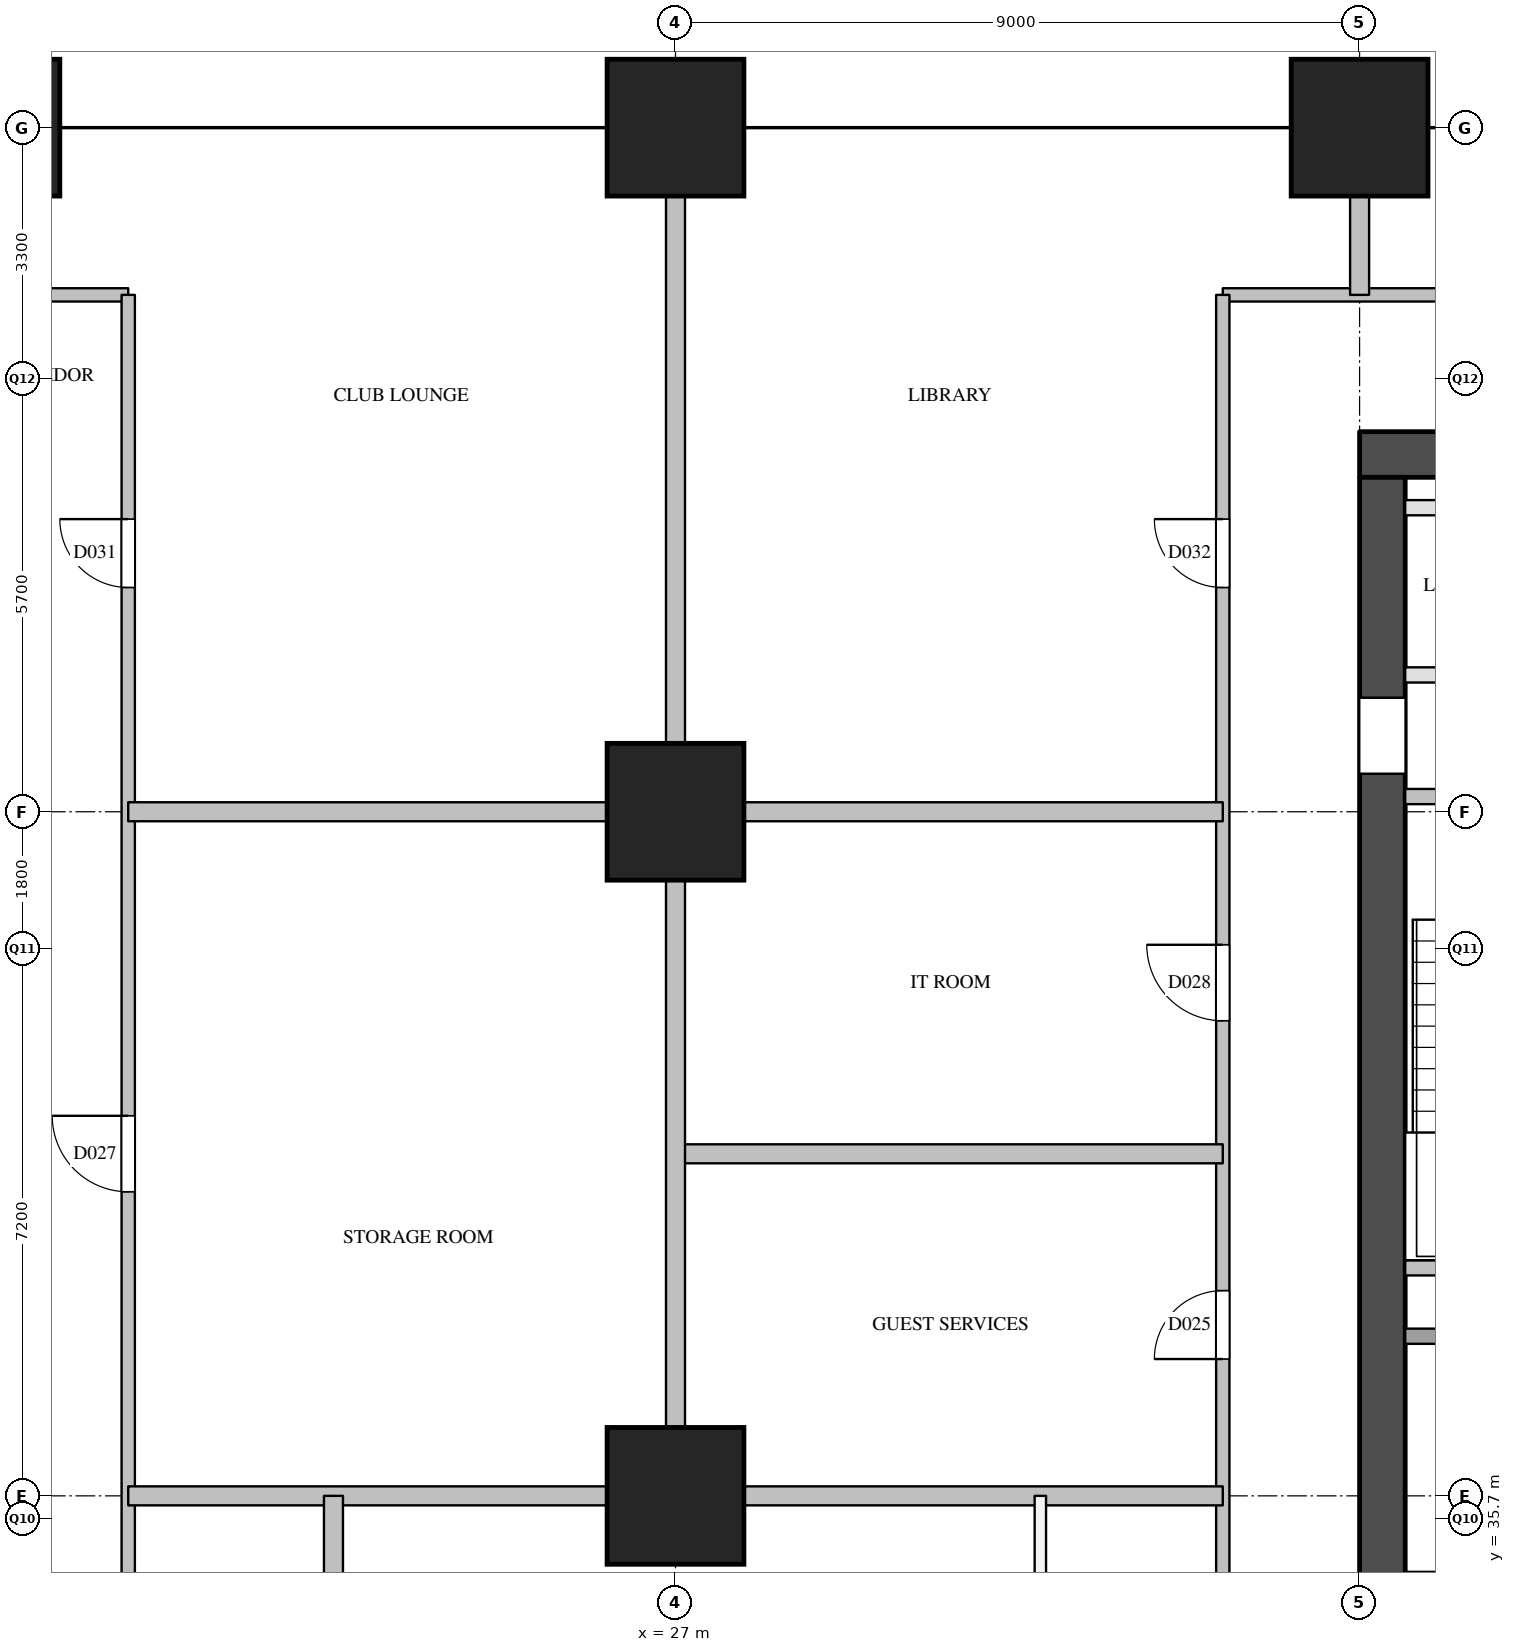
"""IFC4 building model, lengths in metres.
Left out: names, types, materials, properties, quantities, classifications, styles, units other than length and angle.
Written with IfcOpenShell. Run it as: python <this file> out.ifc"""

import sys

from ifc_helpers import new_model, si_unit, direction, frame, frame_2d, origin, origin_2d, place, context, subcontext, project, spatial, rectangle, extrude, element, fill, save


model = new_model("IFC4")
c1 = context("Model", 3, precision=1e-05, world=origin(), true_north=direction((0.0, 1.0)))
c2 = subcontext(c1, "Body", "Model", "MODEL_VIEW")
j1 = project(units=[si_unit("LENGTHUNIT", "METRE"), si_unit("PLANEANGLEUNIT", "RADIAN")], contexts=[c1])
p1 = place(None, origin())
s1 = spatial("IfcSite", under=j1, at=p1, CompositionType="ELEMENT")
p2 = place(p1, origin())
s2 = spatial("IfcBuilding", under=s1, at=p2, CompositionType="ELEMENT")
p3 = place(p2, frame((0.0, 0.0, 100.6)))
s3 = spatial("IfcBuildingStorey", under=s2, at=p3, CompositionType="ELEMENT", Elevation=100.6)
for number, where, z_axis, x_axis in (
    (1, (18.0, 54.0, 0.0), (0.0, 0.0, 1.0), (1.0, 0.0, 0.0)),
    (2, (27.0, 36.0, 0.0), (0.0, 0.0, 1.0), (1.0, 0.0, 0.0)),
    (3, (27.0, 45.0, 0.0), (0.0, 0.0, 1.0), (1.0, 0.0, 0.0)),
    (4, (27.0, 54.0, 0.0), (0.0, 0.0, 1.0), (1.0, 0.0, 0.0)),
    (5, (36.0, 54.0, 0.0), (0.0, 0.0, 1.0), (1.0, 0.0, 0.0)),
):
    element("IfcColumn", number, at=place(p3, frame(where, z_axis=z_axis, x_axis=x_axis)), inside=s3, PredefinedType="COLUMN", context=c2, shape_type="SweptSolid", body=[
        extrude(rectangle(XDim=1.8, YDim=1.8, at=origin_2d()), origin(), (0.0, 0.0, 1.0), 3.8),
    ])
p4 = place(p3, frame((36.0, 49.7, 0.0), z_axis=(0.0, 0.0, 1.0), x_axis=(1.0, 0.0, 0.0)))
e6 = element("IfcWall", 6, at=p4, inside=s3, PredefinedType="SHEAR", context=c2, shape_type="SweptSolid", body=[
    extrude(rectangle(XDim=12.4, YDim=0.6, at=frame_2d((6.2, 0.0))), origin(), (0.0, 0.0, 1.0), 3.5),
])
p5 = place(p3, frame((36.3, 29.1, 0.0), z_axis=(0.0, 0.0, 1.0), x_axis=(0.0, 1.0, 0.0)))
e7 = element("IfcWall", 7, at=p5, inside=s3, PredefinedType="SHEAR", context=c2, shape_type="SweptSolid", body=[
    extrude(rectangle(XDim=20.3, YDim=0.6, at=frame_2d((10.15, 0.0))), origin(), (0.0, 0.0, 1.0), 3.5),
])
p6 = place(p5, frame((3.6, 0.0, 0.0)))
e8 = element("IfcOpeningElement", 8, at=p6, cuts=e7, PredefinedType="OPENING", context=c2, shape_type="SweptSolid", body=[
    extrude(rectangle(XDim=1.8, YDim=2.1, at=frame_2d((0.9, 1.05))), frame((0.0, 0.31, 0.0), z_axis=(0.0, -1.0, 0.0), x_axis=(1.0, 0.0, 0.0)), (0.0, 0.0, 1.0), 0.62),
])
p7 = place(p5, frame((16.4, 0.0, 0.0)))
e9 = element("IfcOpeningElement", 9, at=p7, cuts=e7, PredefinedType="OPENING", context=c2, shape_type="SweptSolid", body=[
    extrude(rectangle(XDim=1.0, YDim=2.1, at=frame_2d((0.5, 1.05))), frame((0.0, 0.31, 0.0), z_axis=(0.0, -1.0, 0.0), x_axis=(1.0, 0.0, 0.0)), (0.0, 0.0, 1.0), 0.62),
])
p8 = place(p3, frame((36.6, 38.1, 0.0), z_axis=(0.0, 0.0, 1.0), x_axis=(1.0, 0.0, 0.0)))
e10 = element("IfcWall", 10, at=p8, inside=s3, PredefinedType="SOLIDWALL", context=c2, shape_type="SweptSolid", body=[
    extrude(rectangle(XDim=6.7, YDim=0.2, at=frame_2d((3.35, 0.0))), origin(), (0.0, 0.0, 1.0), 3.5),
])
p9 = place(p3, frame((36.6, 39.0, 0.0), z_axis=(0.0, 0.0, 1.0), x_axis=(1.0, 0.0, 0.0)))
e11 = element("IfcWall", 11, at=p9, inside=s3, PredefinedType="SOLIDWALL", context=c2, shape_type="SweptSolid", body=[
    extrude(rectangle(XDim=3.25, YDim=0.2, at=frame_2d((1.625, 0.0))), origin(), (0.0, 0.0, 1.0), 3.5),
])
p10 = place(p3, frame((36.6, 45.2, 0.0), z_axis=(0.0, 0.0, 1.0), x_axis=(1.0, 0.0, 0.0)))
e12 = element("IfcWall", 12, at=p10, inside=s3, PredefinedType="SOLIDWALL", context=c2, shape_type="SweptSolid", body=[
    extrude(rectangle(XDim=10.05, YDim=0.2, at=frame_2d((5.025, 0.0))), origin(), (0.0, 0.0, 1.0), 3.5),
])
p11 = place(p10, frame((1.125, 0.0, 0.0)))
e13 = element("IfcOpeningElement", 13, at=p11, cuts=e12, PredefinedType="OPENING", context=c2, shape_type="SweptSolid", body=[
    extrude(rectangle(XDim=1.1, YDim=2.1, at=frame_2d((0.55, 1.05))), frame((0.0, 0.11, 0.0), z_axis=(0.0, -1.0, 0.0), x_axis=(1.0, 0.0, 0.0)), (0.0, 0.0, 1.0), 0.22),
])
p12 = place(p10, frame((4.475, 0.0, 0.0)))
e14 = element("IfcOpeningElement", 14, at=p12, cuts=e12, PredefinedType="OPENING", context=c2, shape_type="SweptSolid", body=[
    extrude(rectangle(XDim=1.1, YDim=2.1, at=frame_2d((0.55, 1.05))), frame((0.0, 0.11, 0.0), z_axis=(0.0, -1.0, 0.0), x_axis=(1.0, 0.0, 0.0)), (0.0, 0.0, 1.0), 0.22),
])
p13 = place(p10, frame((7.825, 0.0, 0.0)))
e15 = element("IfcOpeningElement", 15, at=p13, cuts=e12, PredefinedType="OPENING", context=c2, shape_type="SweptSolid", body=[
    extrude(rectangle(XDim=1.1, YDim=2.1, at=frame_2d((0.55, 1.05))), frame((0.0, 0.11, 0.0), z_axis=(0.0, -1.0, 0.0), x_axis=(1.0, 0.0, 0.0)), (0.0, 0.0, 1.0), 0.22),
])
p14 = place(p3, frame((36.6, 46.8, 0.0), z_axis=(0.0, 0.0, 1.0), x_axis=(1.0, 0.0, 0.0)))
e16 = element("IfcWall", 16, at=p14, inside=s3, PredefinedType="PARTITIONING", context=c2, shape_type="SweptSolid", body=[
    extrude(rectangle(XDim=11.2, YDim=0.2, at=frame_2d((5.6, 0.0))), origin(), (0.0, 0.0, 1.0), 3.5),
])
p15 = place(p14, frame((1.23, 0.0, 0.0)))
e17 = element("IfcOpeningElement", 17, at=p15, cuts=e16, PredefinedType="OPENING", context=c2, shape_type="SweptSolid", body=[
    extrude(rectangle(XDim=0.9, YDim=2.1, at=frame_2d((0.45, 1.05))), frame((0.0, 0.11, 0.0), z_axis=(0.0, -1.0, 0.0), x_axis=(1.0, 0.0, 0.0)), (0.0, 0.0, 1.0), 0.22),
])
p16 = place(p14, frame((6.83, 0.0, 0.0)))
e18 = element("IfcOpeningElement", 18, at=p16, cuts=e16, PredefinedType="OPENING", context=c2, shape_type="SweptSolid", body=[
    extrude(rectangle(XDim=0.9, YDim=2.1, at=frame_2d((0.45, 1.05))), frame((0.0, 0.11, 0.0), z_axis=(0.0, -1.0, 0.0), x_axis=(1.0, 0.0, 0.0)), (0.0, 0.0, 1.0), 0.22),
])
p17 = place(p3, frame((36.6, 49.0, 0.0), z_axis=(0.0, 0.0, 1.0), x_axis=(1.0, 0.0, 0.0)))
e19 = element("IfcWall", 19, at=p17, inside=s3, PredefinedType="PARTITIONING", context=c2, shape_type="SweptSolid", body=[
    extrude(rectangle(XDim=11.2, YDim=0.2, at=frame_2d((5.6, 0.0))), origin(), (0.0, 0.0, 1.0), 3.5),
])
p18 = place(p3, frame((3.8, 51.8, 0.0), z_axis=(0.0, 0.0, 1.0), x_axis=(1.0, 0.0, 0.0)))
e20 = element("IfcWall", 20, at=p18, inside=s3, PredefinedType="PARTITIONING", context=c2, shape_type="SweptSolid", body=[
    extrude(rectangle(XDim=16.0, YDim=0.175, at=frame_2d((8.0, 0.0))), origin(), (0.0, 0.0, 1.0), 3.5),
])
p19 = place(p18, frame((6.314, 0.0, 0.0)))
e21 = element("IfcOpeningElement", 21, at=p19, cuts=e20, PredefinedType="OPENING", context=c2, shape_type="SweptSolid", body=[
    extrude(rectangle(XDim=1.0, YDim=2.1, at=frame_2d((0.5, 1.05))), frame((0.0, 0.097, 0.0), z_axis=(0.0, -1.0, 0.0), x_axis=(1.0, 0.0, 0.0)), (0.0, 0.0, 1.0), 0.195),
])
p20 = place(p18, frame((11.5, 0.0, 0.0)))
e22 = element("IfcOpeningElement", 22, at=p20, cuts=e20, PredefinedType="OPENING", context=c2, shape_type="SweptSolid", body=[
    extrude(rectangle(XDim=0.9, YDim=2.1, at=frame_2d((0.45, 1.05))), frame((0.0, 0.097, 0.0), z_axis=(0.0, -1.0, 0.0), x_axis=(1.0, 0.0, 0.0)), (0.0, 0.0, 1.0), 0.195),
])
p21 = place(p3, frame((34.2, 51.8, 0.0), z_axis=(0.0, 0.0, 1.0), x_axis=(1.0, 0.0, 0.0)))
e23 = element("IfcWall", 23, at=p21, inside=s3, PredefinedType="PARTITIONING", context=c2, shape_type="SweptSolid", body=[
    extrude(rectangle(XDim=16.0, YDim=0.175, at=frame_2d((8.0, 0.0))), origin(), (0.0, 0.0, 1.0), 3.5),
])
p22 = place(p21, frame((8.45, 0.0, 0.0)))
e24 = element("IfcOpeningElement", 24, at=p22, cuts=e23, PredefinedType="OPENING", context=c2, shape_type="SweptSolid", body=[
    extrude(rectangle(XDim=0.9, YDim=2.1, at=frame_2d((0.45, 1.05))), frame((0.0, 0.097, 0.0), z_axis=(0.0, -1.0, 0.0), x_axis=(1.0, 0.0, 0.0)), (0.0, 0.0, 1.0), 0.195),
])
p23 = place(p3, frame((19.8, 28.5, 0.0), z_axis=(0.0, 0.0, 1.0), x_axis=(0.0, 1.0, 0.0)))
e25 = element("IfcWall", 25, at=p23, inside=s3, PredefinedType="PARTITIONING", context=c2, shape_type="SweptSolid", body=[
    extrude(rectangle(XDim=23.3, YDim=0.175, at=frame_2d((11.65, 0.0))), origin(), (0.0, 0.0, 1.0), 3.5),
])
p24 = place(p23, frame((3.3, 0.0, 0.0)))
e26 = element("IfcOpeningElement", 26, at=p24, cuts=e25, PredefinedType="OPENING", context=c2, shape_type="SweptSolid", body=[
    extrude(rectangle(XDim=0.9, YDim=2.1, at=frame_2d((0.45, 1.05))), frame((0.0, 0.097, 0.0), z_axis=(0.0, -1.0, 0.0), x_axis=(1.0, 0.0, 0.0)), (0.0, 0.0, 1.0), 0.195),
])
p25 = place(p23, frame((11.5, 0.0, 0.0)))
e27 = element("IfcOpeningElement", 27, at=p25, cuts=e25, PredefinedType="OPENING", context=c2, shape_type="SweptSolid", body=[
    extrude(rectangle(XDim=1.0, YDim=2.1, at=frame_2d((0.5, 1.05))), frame((0.0, 0.097, 0.0), z_axis=(0.0, -1.0, 0.0), x_axis=(1.0, 0.0, 0.0)), (0.0, 0.0, 1.0), 0.195),
])
p26 = place(p23, frame((19.45, 0.0, 0.0)))
e28 = element("IfcOpeningElement", 28, at=p26, cuts=e25, PredefinedType="OPENING", context=c2, shape_type="SweptSolid", body=[
    extrude(rectangle(XDim=0.9, YDim=2.1, at=frame_2d((0.45, 1.05))), frame((0.0, 0.097, 0.0), z_axis=(0.0, -1.0, 0.0), x_axis=(1.0, 0.0, 0.0)), (0.0, 0.0, 1.0), 0.195),
])
p27 = place(p3, frame((34.2, 29.12, 0.0), z_axis=(0.0, 0.0, 1.0), x_axis=(0.0, 1.0, 0.0)))
e29 = element("IfcWall", 29, at=p27, inside=s3, PredefinedType="PARTITIONING", context=c2, shape_type="SweptSolid", body=[
    extrude(rectangle(XDim=22.68, YDim=0.175, at=frame_2d((11.34, 0.0))), origin(), (0.0, 0.0, 1.0), 3.5),
])
p28 = place(p27, frame((3.08, 0.0, 0.0)))
e30 = element("IfcOpeningElement", 30, at=p28, cuts=e29, PredefinedType="OPENING", context=c2, shape_type="SweptSolid", body=[
    extrude(rectangle(XDim=1.0, YDim=2.1, at=frame_2d((0.5, 1.05))), frame((0.0, 0.097, 0.0), z_axis=(0.0, -1.0, 0.0), x_axis=(1.0, 0.0, 0.0)), (0.0, 0.0, 1.0), 0.195),
])
p29 = place(p27, frame((8.68, 0.0, 0.0)))
e31 = element("IfcOpeningElement", 31, at=p29, cuts=e29, PredefinedType="OPENING", context=c2, shape_type="SweptSolid", body=[
    extrude(rectangle(XDim=0.9, YDim=2.1, at=frame_2d((0.45, 1.05))), frame((0.0, 0.097, 0.0), z_axis=(0.0, -1.0, 0.0), x_axis=(1.0, 0.0, 0.0)), (0.0, 0.0, 1.0), 0.195),
])
p30 = place(p27, frame((13.13, 0.0, 0.0)))
e32 = element("IfcOpeningElement", 32, at=p30, cuts=e29, PredefinedType="OPENING", context=c2, shape_type="SweptSolid", body=[
    extrude(rectangle(XDim=1.0, YDim=2.1, at=frame_2d((0.5, 1.05))), frame((0.0, 0.097, 0.0), z_axis=(0.0, -1.0, 0.0), x_axis=(1.0, 0.0, 0.0)), (0.0, 0.0, 1.0), 0.195),
])
p31 = place(p27, frame((18.83, 0.0, 0.0)))
e33 = element("IfcOpeningElement", 33, at=p31, cuts=e29, PredefinedType="OPENING", context=c2, shape_type="SweptSolid", body=[
    extrude(rectangle(XDim=0.9, YDim=2.1, at=frame_2d((0.45, 1.05))), frame((0.0, 0.097, 0.0), z_axis=(0.0, -1.0, 0.0), x_axis=(1.0, 0.0, 0.0)), (0.0, 0.0, 1.0), 0.195),
])
p32 = place(p3, frame((31.8, 29.4, 0.0), z_axis=(0.0, 0.0, 1.0), x_axis=(0.0, 1.0, 0.0)))
e34 = element("IfcWall", 34, at=p32, inside=s3, PredefinedType="PARTITIONING", context=c2, shape_type="SweptSolid", body=[
    extrude(rectangle(XDim=6.6, YDim=0.15, at=frame_2d((3.3, 0.0))), origin(), (0.0, 0.0, 1.0), 3.5),
])
p33 = place(p32, frame((2.85, 0.0, 0.0)))
e35 = element("IfcOpeningElement", 35, at=p33, cuts=e34, PredefinedType="OPENING", context=c2, shape_type="SweptSolid", body=[
    extrude(rectangle(XDim=0.9, YDim=2.1, at=frame_2d((0.45, 1.05))), frame((0.0, 0.085, 0.0), z_axis=(0.0, -1.0, 0.0), x_axis=(1.0, 0.0, 0.0)), (0.0, 0.0, 1.0), 0.17),
])
p34 = place(p3, frame((19.8, 36.0, 0.0), z_axis=(0.0, 0.0, 1.0), x_axis=(1.0, 0.0, 0.0)))
e36 = element("IfcWall", 36, at=p34, inside=s3, PredefinedType="PARTITIONING", context=c2, shape_type="SweptSolid", body=[
    extrude(rectangle(XDim=14.4, YDim=0.25, at=frame_2d((7.2, 0.0))), origin(), (0.0, 0.0, 1.0), 3.5),
])
p35 = place(p3, frame((27.0, 40.5, 0.0), z_axis=(0.0, 0.0, 1.0), x_axis=(1.0, 0.0, 0.0)))
e37 = element("IfcWall", 37, at=p35, inside=s3, PredefinedType="PARTITIONING", context=c2, shape_type="SweptSolid", body=[
    extrude(rectangle(XDim=7.2, YDim=0.25, at=frame_2d((3.6, 0.0))), origin(), (0.0, 0.0, 1.0), 2.5),
])
p36 = place(p3, frame((19.8, 45.0, 0.0), z_axis=(0.0, 0.0, 1.0), x_axis=(1.0, 0.0, 0.0)))
e38 = element("IfcWall", 38, at=p36, inside=s3, PredefinedType="PARTITIONING", context=c2, shape_type="SweptSolid", body=[
    extrude(rectangle(XDim=14.4, YDim=0.25, at=frame_2d((7.2, 0.0))), origin(), (0.0, 0.0, 1.0), 3.5),
])
p37 = place(p3, frame((22.5, 27.0, 0.0), z_axis=(0.0, 0.0, 1.0), x_axis=(0.0, 1.0, 0.0)))
e39 = element("IfcWall", 39, at=p37, inside=s3, PredefinedType="PARTITIONING", context=c2, shape_type="SweptSolid", body=[
    extrude(rectangle(XDim=9.0, YDim=0.25, at=frame_2d((4.5, 0.0))), origin(), (0.0, 0.0, 1.0), 2.5),
])
p38 = place(p3, frame((27.0, 36.0, 0.0), z_axis=(0.0, 0.0, 1.0), x_axis=(0.0, 1.0, 0.0)))
e40 = element("IfcWall", 40, at=p38, inside=s3, PredefinedType="PARTITIONING", context=c2, shape_type="SweptSolid", body=[
    extrude(rectangle(XDim=18.0, YDim=0.25, at=frame_2d((9.0, 0.0))), origin(), (0.0, 0.0, 1.0), 2.5),
])
p39 = place(p3, frame((36.0, 51.8, 0.0), z_axis=(0.0, 0.0, 1.0), x_axis=(0.0, 1.0, 0.0)))
e41 = element("IfcWall", 41, at=p39, inside=s3, PredefinedType="PARTITIONING", context=c2, shape_type="SweptSolid", body=[
    extrude(rectangle(XDim=2.2, YDim=0.25, at=frame_2d((1.1, 0.0))), origin(), (0.0, 0.0, 1.0), 3.5),
])
p40 = place(p7, origin())
e42 = element("IfcDoor", 42, at=p40, inside=s3, OperationType="SINGLE_SWING_RIGHT", PredefinedType="DOOR", context=c2, shape_type="SweptSolid", body=[
    extrude(rectangle(XDim=1.0, YDim=2.1, at=frame_2d((0.5, 1.05))), frame((0.0, 0.025, 0.0), z_axis=(0.0, -1.0, 0.0), x_axis=(1.0, 0.0, 0.0)), (0.0, 0.0, 1.0), 0.05),
])
fill(e9, e42)
p41 = place(p29, origin())
e43 = element("IfcDoor", 43, at=p41, inside=s3, OperationType="SINGLE_SWING_LEFT", PredefinedType="DOOR", context=c2, shape_type="SweptSolid", body=[
    extrude(rectangle(XDim=0.9, YDim=2.1, at=frame_2d((0.45, 1.05))), frame((0.0, 0.025, 0.0), z_axis=(0.0, -1.0, 0.0), x_axis=(1.0, 0.0, 0.0)), (0.0, 0.0, 1.0), 0.05),
])
fill(e31, e43)
p42 = place(p25, origin())
e44 = element("IfcDoor", 44, at=p42, inside=s3, OperationType="SINGLE_SWING_RIGHT", PredefinedType="DOOR", context=c2, shape_type="SweptSolid", body=[
    extrude(rectangle(XDim=1.0, YDim=2.1, at=frame_2d((0.5, 1.05))), frame((0.0, 0.025, 0.0), z_axis=(0.0, -1.0, 0.0), x_axis=(1.0, 0.0, 0.0)), (0.0, 0.0, 1.0), 0.05),
])
fill(e27, e44)
p43 = place(p30, origin())
e45 = element("IfcDoor", 45, at=p43, inside=s3, OperationType="SINGLE_SWING_RIGHT", PredefinedType="DOOR", context=c2, shape_type="SweptSolid", body=[
    extrude(rectangle(XDim=1.0, YDim=2.1, at=frame_2d((0.5, 1.05))), frame((0.0, 0.025, 0.0), z_axis=(0.0, -1.0, 0.0), x_axis=(1.0, 0.0, 0.0)), (0.0, 0.0, 1.0), 0.05),
])
fill(e32, e45)
p44 = place(p26, origin())
e46 = element("IfcDoor", 46, at=p44, inside=s3, OperationType="SINGLE_SWING_RIGHT", PredefinedType="DOOR", context=c2, shape_type="SweptSolid", body=[
    extrude(rectangle(XDim=0.9, YDim=2.1, at=frame_2d((0.45, 1.05))), frame((0.0, 0.025, 0.0), z_axis=(0.0, -1.0, 0.0), x_axis=(1.0, 0.0, 0.0)), (0.0, 0.0, 1.0), 0.05),
])
fill(e28, e46)
p45 = place(p31, origin())
e47 = element("IfcDoor", 47, at=p45, inside=s3, OperationType="SINGLE_SWING_RIGHT", PredefinedType="DOOR", context=c2, shape_type="SweptSolid", body=[
    extrude(rectangle(XDim=0.9, YDim=2.1, at=frame_2d((0.45, 1.05))), frame((0.0, 0.025, 0.0), z_axis=(0.0, -1.0, 0.0), x_axis=(1.0, 0.0, 0.0)), (0.0, 0.0, 1.0), 0.05),
])
fill(e33, e47)
save(model, sys.argv[1])
